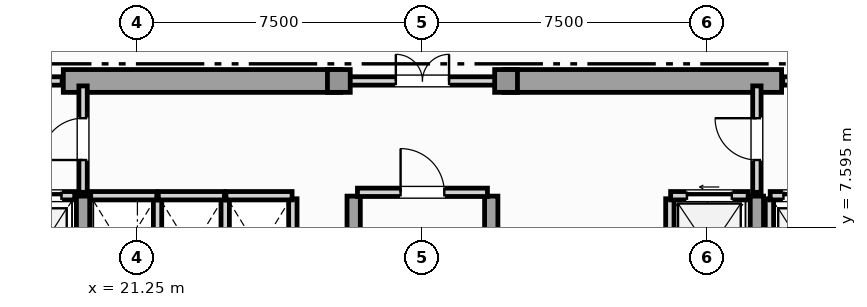
"""IFC4 building model, lengths in metres.
Left out: names, types, materials, properties, quantities, classifications, styles, units other than length and angle.
Written with IfcOpenShell. Run it as: python <this file> out.ifc"""

import sys

from ifc_helpers import new_model, si_unit, direction, frame, frame_2d, origin, origin_2d, place, context, subcontext, project, spatial, rectangle, extrude, element, fill, save


model = new_model("IFC4")
c1 = context("Model", 3, precision=1e-05, world=origin(), true_north=direction((0.0, 1.0)))
c2 = subcontext(c1, "Body", "Model", "MODEL_VIEW")
j1 = project(units=[si_unit("LENGTHUNIT", "METRE"), si_unit("PLANEANGLEUNIT", "RADIAN")], contexts=[c1])
p1 = place(None, origin())
s1 = spatial("IfcSite", under=j1, at=p1, CompositionType="ELEMENT")
p2 = place(p1, origin())
s2 = spatial("IfcBuilding", under=s1, at=p2, CompositionType="ELEMENT")
p3 = place(p2, frame((0.0, 0.0, 242.65)))
s3 = spatial("IfcBuildingStorey", under=s2, at=p3, CompositionType="ELEMENT", Elevation=242.65)
for number, where, z_axis, x_axis in (
    (1, (19.3, 11.45, 0.0), (0.0, 0.0, 1.0), (1.0, 0.0, 0.0)),
    (2, (30.9, 11.45, 0.0), (0.0, 0.0, 1.0), (1.0, 0.0, 0.0)),
):
    element("IfcWall", number, at=place(p3, frame(where, z_axis=z_axis, x_axis=x_axis)), inside=s3, PredefinedType="SHEAR", context=c2, shape_type="SweptSolid", body=[
        extrude(rectangle(XDim=7.3, YDim=0.6, at=frame_2d((3.65, 0.0))), origin(), (0.0, 0.0, 1.0), 3.5),
    ])
for number, where, z_axis, x_axis in (
    (3, (19.82, 0.92, 0.0), (0.0, 0.0, 1.0), (0.0, 1.0, 0.0)),
    (4, (26.94, 0.92, 0.0), (0.0, 0.0, 1.0), (0.0, 1.0, 0.0)),
    (5, (30.56, 0.92, 0.0), (0.0, 0.0, 1.0), (0.0, 1.0, 0.0)),
    (6, (37.55, 0.92, 0.0), (0.0, 0.0, 1.0), (0.0, 1.0, 0.0)),
):
    element("IfcWall", number, at=place(p3, frame(where, z_axis=z_axis, x_axis=x_axis)), inside=s3, PredefinedType="SHEAR", context=c2, shape_type="SweptSolid", body=[
        extrude(rectangle(XDim=7.5, YDim=0.35, at=frame_2d((3.75, 0.0))), origin(), (0.0, 0.0, 1.0), 3.5),
    ])
for number, where, z_axis, x_axis in (
    (7, (26.55, 11.45, 0.0), (0.0, 0.0, 1.0), (1.0, 0.0, 0.0)),
    (8, (30.95, 11.45, 0.0), (0.0, 0.0, 1.0), (1.0, 0.0, 0.0)),
):
    element("IfcColumn", number, at=place(p3, frame(where, z_axis=z_axis, x_axis=x_axis)), inside=s3, PredefinedType="COLUMN", context=c2, shape_type="SweptSolid", body=[
        extrude(rectangle(XDim=0.6, YDim=0.6, at=origin_2d()), origin(), (0.0, 0.0, 1.0), 3.85),
    ])
p4 = place(p3, frame((17.78, 8.43, 0.0), z_axis=(0.0, 0.0, 1.0), x_axis=(1.0, 0.0, 0.0)))
e9 = element("IfcWall", 9, at=p4, inside=s3, PredefinedType="SOLIDWALL", context=c2, shape_type="SweptSolid", body=[
    extrude(rectangle(XDim=1.82, YDim=0.22, at=frame_2d((0.91, 0.0))), origin(), (0.0, 0.0, 1.0), 3.5),
])
p5 = place(p4, frame((0.35, 0.0, 0.0)))
e10 = element("IfcOpeningElement", 10, at=p5, cuts=e9, PredefinedType="OPENING", context=c2, shape_type="SweptSolid", body=[
    extrude(rectangle(XDim=1.12, YDim=2.25, at=frame_2d((0.56, 1.125))), frame((0.0, 0.12, 0.0), z_axis=(0.0, -1.0, 0.0), x_axis=(1.0, 0.0, 0.0)), (0.0, 0.0, 1.0), 0.24),
])
p6 = place(p3, frame((37.88, 5.65, 0.0), z_axis=(0.0, 0.0, 1.0), x_axis=(0.0, 1.0, 0.0)))
e11 = element("IfcWall", 11, at=p6, inside=s3, PredefinedType="SOLIDWALL", context=c2, shape_type="SweptSolid", body=[
    extrude(rectangle(XDim=2.7, YDim=0.22, at=frame_2d((1.35, 0.0))), origin(), (0.0, 0.0, 1.0), 3.5),
])
p7 = place(p3, frame((37.9, 8.43, 0.0), z_axis=(0.0, 0.0, 1.0), x_axis=(1.0, 0.0, 0.0)))
e12 = element("IfcWall", 12, at=p7, inside=s3, PredefinedType="SOLIDWALL", context=c2, shape_type="SweptSolid", body=[
    extrude(rectangle(XDim=1.82, YDim=0.22, at=frame_2d((0.91, 0.0))), origin(), (0.0, 0.0, 1.0), 3.5),
])
p8 = place(p7, frame((0.35, 0.0, 0.0)))
e13 = element("IfcOpeningElement", 13, at=p8, cuts=e12, PredefinedType="OPENING", context=c2, shape_type="SweptSolid", body=[
    extrude(rectangle(XDim=1.12, YDim=2.25, at=frame_2d((0.56, 1.125))), frame((0.0, 0.12, 0.0), z_axis=(0.0, -1.0, 0.0), x_axis=(1.0, 0.0, 0.0)), (0.0, 0.0, 1.0), 0.24),
])
p9 = place(p3, frame((35.26, 5.65, 0.0), z_axis=(0.0, 0.0, 1.0), x_axis=(0.0, 1.0, 0.0)))
e14 = element("IfcWall", 14, at=p9, inside=s3, PredefinedType="SOLIDWALL", context=c2, shape_type="SweptSolid", body=[
    extrude(rectangle(XDim=2.7, YDim=0.22, at=frame_2d((1.35, 0.0))), origin(), (0.0, 0.0, 1.0), 3.5),
])
p10 = place(p3, frame((35.28, 8.43, 0.0), z_axis=(0.0, 0.0, 1.0), x_axis=(1.0, 0.0, 0.0)))
e15 = element("IfcWall", 15, at=p10, inside=s3, PredefinedType="SOLIDWALL", context=c2, shape_type="SweptSolid", body=[
    extrude(rectangle(XDim=2.04, YDim=0.22, at=frame_2d((1.02, 0.0))), origin(), (0.0, 0.0, 1.0), 3.5),
])
p11 = place(p10, frame((0.43, 0.0, 0.0)))
e16 = element("IfcOpeningElement", 16, at=p11, cuts=e15, PredefinedType="OPENING", context=c2, shape_type="SweptSolid", body=[
    extrude(rectangle(XDim=1.18, YDim=2.2, at=frame_2d((0.59, 1.1))), frame((0.0, 0.12, 0.0), z_axis=(0.0, -1.0, 0.0), x_axis=(1.0, 0.0, 0.0)), (0.0, 0.0, 1.0), 0.24),
])
p12 = place(p3, frame((21.78, 5.65, 0.0), z_axis=(0.0, 0.0, 1.0), x_axis=(0.0, 1.0, 0.0)))
e17 = element("IfcWall", 17, at=p12, inside=s3, PredefinedType="SOLIDWALL", context=c2, shape_type="SweptSolid", body=[
    extrude(rectangle(XDim=2.7, YDim=0.22, at=frame_2d((1.35, 0.0))), origin(), (0.0, 0.0, 1.0), 3.5),
])
p13 = place(p3, frame((20.02, 8.43, 0.0), z_axis=(0.0, 0.0, 1.0), x_axis=(1.0, 0.0, 0.0)))
e18 = element("IfcWall", 18, at=p13, inside=s3, PredefinedType="SOLIDWALL", context=c2, shape_type="SweptSolid", body=[
    extrude(rectangle(XDim=1.74, YDim=0.22, at=frame_2d((0.87, 0.0))), origin(), (0.0, 0.0, 1.0), 3.5),
])
p14 = place(p3, frame((23.56, 5.65, 0.0), z_axis=(0.0, 0.0, 1.0), x_axis=(0.0, 1.0, 0.0)))
e19 = element("IfcWall", 19, at=p14, inside=s3, PredefinedType="SOLIDWALL", context=c2, shape_type="SweptSolid", body=[
    extrude(rectangle(XDim=2.7, YDim=0.22, at=frame_2d((1.35, 0.0))), origin(), (0.0, 0.0, 1.0), 3.5),
])
p15 = place(p3, frame((21.8, 8.43, 0.0), z_axis=(0.0, 0.0, 1.0), x_axis=(1.0, 0.0, 0.0)))
e20 = element("IfcWall", 20, at=p15, inside=s3, PredefinedType="SOLIDWALL", context=c2, shape_type="SweptSolid", body=[
    extrude(rectangle(XDim=1.74, YDim=0.22, at=frame_2d((0.87, 0.0))), origin(), (0.0, 0.0, 1.0), 3.5),
])
p16 = place(p3, frame((25.34, 5.65, 0.0), z_axis=(0.0, 0.0, 1.0), x_axis=(0.0, 1.0, 0.0)))
e21 = element("IfcWall", 21, at=p16, inside=s3, PredefinedType="SOLIDWALL", context=c2, shape_type="SweptSolid", body=[
    extrude(rectangle(XDim=2.7, YDim=0.22, at=frame_2d((1.35, 0.0))), origin(), (0.0, 0.0, 1.0), 3.5),
])
p17 = place(p3, frame((23.58, 8.43, 0.0), z_axis=(0.0, 0.0, 1.0), x_axis=(1.0, 0.0, 0.0)))
e22 = element("IfcWall", 22, at=p17, inside=s3, PredefinedType="SOLIDWALL", context=c2, shape_type="SweptSolid", body=[
    extrude(rectangle(XDim=1.74, YDim=0.22, at=frame_2d((0.87, 0.0))), origin(), (0.0, 0.0, 1.0), 3.5),
])
p18 = place(p3, frame((27.04, 8.52, 0.0), z_axis=(0.0, 0.0, 1.0), x_axis=(1.0, 0.0, 0.0)))
e23 = element("IfcWall", 23, at=p18, inside=s3, PredefinedType="SOLIDWALL", context=c2, shape_type="SweptSolid", body=[
    extrude(rectangle(XDim=3.42, YDim=0.22, at=frame_2d((1.71, 0.0))), origin(), (0.0, 0.0, 1.0), 3.5),
])
p19 = place(p18, frame((1.135, 0.0, 0.0)))
e24 = element("IfcOpeningElement", 24, at=p19, cuts=e23, PredefinedType="OPENING", context=c2, shape_type="SweptSolid", body=[
    extrude(rectangle(XDim=1.15, YDim=2.2, at=frame_2d((0.575, 1.1))), frame((0.0, 0.12, 0.0), z_axis=(0.0, -1.0, 0.0), x_axis=(1.0, 0.0, 0.0)), (0.0, 0.0, 1.0), 0.24),
])
p20 = place(p3, frame((19.82, 8.52, 0.0), z_axis=(0.0, 0.0, 1.0), x_axis=(0.0, 1.0, 0.0)))
e25 = element("IfcWall", 25, at=p20, inside=s3, PredefinedType="SOLIDWALL", context=c2, shape_type="SweptSolid", body=[
    extrude(rectangle(XDim=2.8, YDim=0.22, at=frame_2d((1.4, 0.0))), origin(), (0.0, 0.0, 1.0), 2.956),
])
p21 = place(p20, frame((0.85, 0.0, 0.0)))
e26 = element("IfcOpeningElement", 26, at=p21, cuts=e25, PredefinedType="OPENING", context=c2, shape_type="SweptSolid", body=[
    extrude(rectangle(XDim=1.1, YDim=2.2, at=frame_2d((0.55, 1.1))), frame((0.0, 0.12, 0.0), z_axis=(0.0, -1.0, 0.0), x_axis=(1.0, 0.0, 0.0)), (0.0, 0.0, 1.0), 0.24),
])
p22 = place(p3, frame((37.55, 8.52, 0.0), z_axis=(0.0, 0.0, 1.0), x_axis=(0.0, 1.0, 0.0)))
e27 = element("IfcWall", 27, at=p22, inside=s3, PredefinedType="SOLIDWALL", context=c2, shape_type="SweptSolid", body=[
    extrude(rectangle(XDim=2.8, YDim=0.22, at=frame_2d((1.4, 0.0))), origin(), (0.0, 0.0, 1.0), 2.956),
])
p23 = place(p22, frame((0.85, 0.0, 0.0)))
e28 = element("IfcOpeningElement", 28, at=p23, cuts=e27, PredefinedType="OPENING", context=c2, shape_type="SweptSolid", body=[
    extrude(rectangle(XDim=1.1, YDim=2.2, at=frame_2d((0.55, 1.1))), frame((0.0, 0.12, 0.0), z_axis=(0.0, -1.0, 0.0), x_axis=(1.0, 0.0, 0.0)), (0.0, 0.0, 1.0), 0.24),
])
p24 = place(p3, frame((16.23, 11.45, 0.0), z_axis=(0.0, 0.0, 1.0), x_axis=(1.0, 0.0, 0.0)))
e29 = element("IfcWall", 29, at=p24, inside=s3, PredefinedType="SOLIDWALL", context=c2, shape_type="SweptSolid", body=[
    extrude(rectangle(XDim=3.04, YDim=0.22, at=frame_2d((1.52, 0.0))), origin(), (0.0, 0.0, 1.0), 3.5),
])
p25 = place(p24, frame((0.97, 0.0, 0.0)))
e30 = element("IfcOpeningElement", 30, at=p25, cuts=e29, PredefinedType="OPENING", context=c2, shape_type="SweptSolid", body=[
    extrude(rectangle(XDim=1.1, YDim=2.2, at=frame_2d((0.55, 1.1))), frame((0.0, 0.12, 0.0), z_axis=(0.0, -1.0, 0.0), x_axis=(1.0, 0.0, 0.0)), (0.0, 0.0, 1.0), 0.24),
])
p26 = place(p3, frame((26.63, 11.45, 0.0), z_axis=(0.0, 0.0, 1.0), x_axis=(1.0, 0.0, 0.0)))
e31 = element("IfcWall", 31, at=p26, inside=s3, PredefinedType="SOLIDWALL", context=c2, shape_type="SweptSolid", body=[
    extrude(rectangle(XDim=4.24, YDim=0.22, at=frame_2d((2.12, 0.0))), origin(), (0.0, 0.0, 1.0), 3.5),
])
p27 = place(p26, frame((1.42, 0.0, 0.0)))
e32 = element("IfcOpeningElement", 32, at=p27, cuts=e31, PredefinedType="OPENING", context=c2, shape_type="SweptSolid", body=[
    extrude(rectangle(XDim=1.4, YDim=2.2, at=frame_2d((0.7, 1.1))), frame((0.0, 0.12, 0.0), z_axis=(0.0, -1.0, 0.0), x_axis=(1.0, 0.0, 0.0)), (0.0, 0.0, 1.0), 0.24),
])
p28 = place(p3, frame((38.23, 11.45, 0.0), z_axis=(0.0, 0.0, 1.0), x_axis=(1.0, 0.0, 0.0)))
e33 = element("IfcWall", 33, at=p28, inside=s3, PredefinedType="SOLIDWALL", context=c2, shape_type="SweptSolid", body=[
    extrude(rectangle(XDim=3.04, YDim=0.22, at=frame_2d((1.52, 0.0))), origin(), (0.0, 0.0, 1.0), 3.5),
])
p29 = place(p28, frame((0.97, 0.0, 0.0)))
e34 = element("IfcOpeningElement", 34, at=p29, cuts=e33, PredefinedType="OPENING", context=c2, shape_type="SweptSolid", body=[
    extrude(rectangle(XDim=1.1, YDim=2.2, at=frame_2d((0.55, 1.1))), frame((0.0, 0.12, 0.0), z_axis=(0.0, -1.0, 0.0), x_axis=(1.0, 0.0, 0.0)), (0.0, 0.0, 1.0), 0.24),
])
p30 = place(p5, origin())
e35 = element("IfcDoor", 35, at=p30, inside=s3, OperationType="SLIDING_TO_LEFT", PredefinedType="DOOR", context=c2, shape_type="SweptSolid", body=[
    extrude(rectangle(XDim=1.12, YDim=2.25, at=frame_2d((0.56, 1.125))), frame((0.0, 0.025, 0.0), z_axis=(0.0, -1.0, 0.0), x_axis=(1.0, 0.0, 0.0)), (0.0, 0.0, 1.0), 0.05),
])
fill(e10, e35)
p31 = place(p8, origin())
e36 = element("IfcDoor", 36, at=p31, inside=s3, OperationType="SLIDING_TO_RIGHT", PredefinedType="DOOR", context=c2, shape_type="SweptSolid", body=[
    extrude(rectangle(XDim=1.12, YDim=2.25, at=frame_2d((0.56, 1.125))), frame((0.0, 0.025, 0.0), z_axis=(0.0, -1.0, 0.0), x_axis=(1.0, 0.0, 0.0)), (0.0, 0.0, 1.0), 0.05),
])
fill(e13, e36)
p32 = place(p11, origin())
e37 = element("IfcDoor", 37, at=p32, inside=s3, OperationType="SLIDING_TO_LEFT", PredefinedType="DOOR", context=c2, shape_type="SweptSolid", body=[
    extrude(rectangle(XDim=1.18, YDim=2.2, at=frame_2d((0.59, 1.1))), frame((0.0, 0.025, 0.0), z_axis=(0.0, -1.0, 0.0), x_axis=(1.0, 0.0, 0.0)), (0.0, 0.0, 1.0), 0.05),
])
fill(e16, e37)
p33 = place(p19, origin())
e38 = element("IfcDoor", 38, at=p33, inside=s3, OperationType="SINGLE_SWING_LEFT", PredefinedType="DOOR", context=c2, shape_type="SweptSolid", body=[
    extrude(rectangle(XDim=1.15, YDim=2.2, at=frame_2d((0.575, 1.1))), frame((0.0, 0.025, 0.0), z_axis=(0.0, -1.0, 0.0), x_axis=(1.0, 0.0, 0.0)), (0.0, 0.0, 1.0), 0.05),
])
fill(e24, e38)
p34 = place(p21, origin())
e39 = element("IfcDoor", 39, at=p34, inside=s3, OperationType="SINGLE_SWING_LEFT", PredefinedType="DOOR", context=c2, shape_type="SweptSolid", body=[
    extrude(rectangle(XDim=1.1, YDim=2.2, at=frame_2d((0.55, 1.1))), frame((0.0, 0.025, 0.0), z_axis=(0.0, -1.0, 0.0), x_axis=(1.0, 0.0, 0.0)), (0.0, 0.0, 1.0), 0.05),
])
fill(e26, e39)
p35 = place(p23, origin())
e40 = element("IfcDoor", 40, at=p35, inside=s3, OperationType="SINGLE_SWING_RIGHT", PredefinedType="DOOR", context=c2, shape_type="SweptSolid", body=[
    extrude(rectangle(XDim=1.1, YDim=2.2, at=frame_2d((0.55, 1.1))), frame((0.0, 0.025, 0.0), z_axis=(0.0, -1.0, 0.0), x_axis=(1.0, 0.0, 0.0)), (0.0, 0.0, 1.0), 0.05),
])
fill(e28, e40)
p36 = place(p27, origin())
e41 = element("IfcDoor", 41, at=p36, inside=s3, OperationType="DOUBLE_DOOR_SINGLE_SWING", PredefinedType="DOOR", context=c2, shape_type="SweptSolid", body=[
    extrude(rectangle(XDim=1.4, YDim=2.2, at=frame_2d((0.7, 1.1))), frame((0.0, 0.025, 0.0), z_axis=(0.0, -1.0, 0.0), x_axis=(1.0, 0.0, 0.0)), (0.0, 0.0, 1.0), 0.05),
])
fill(e32, e41)
save(model, sys.argv[1])
